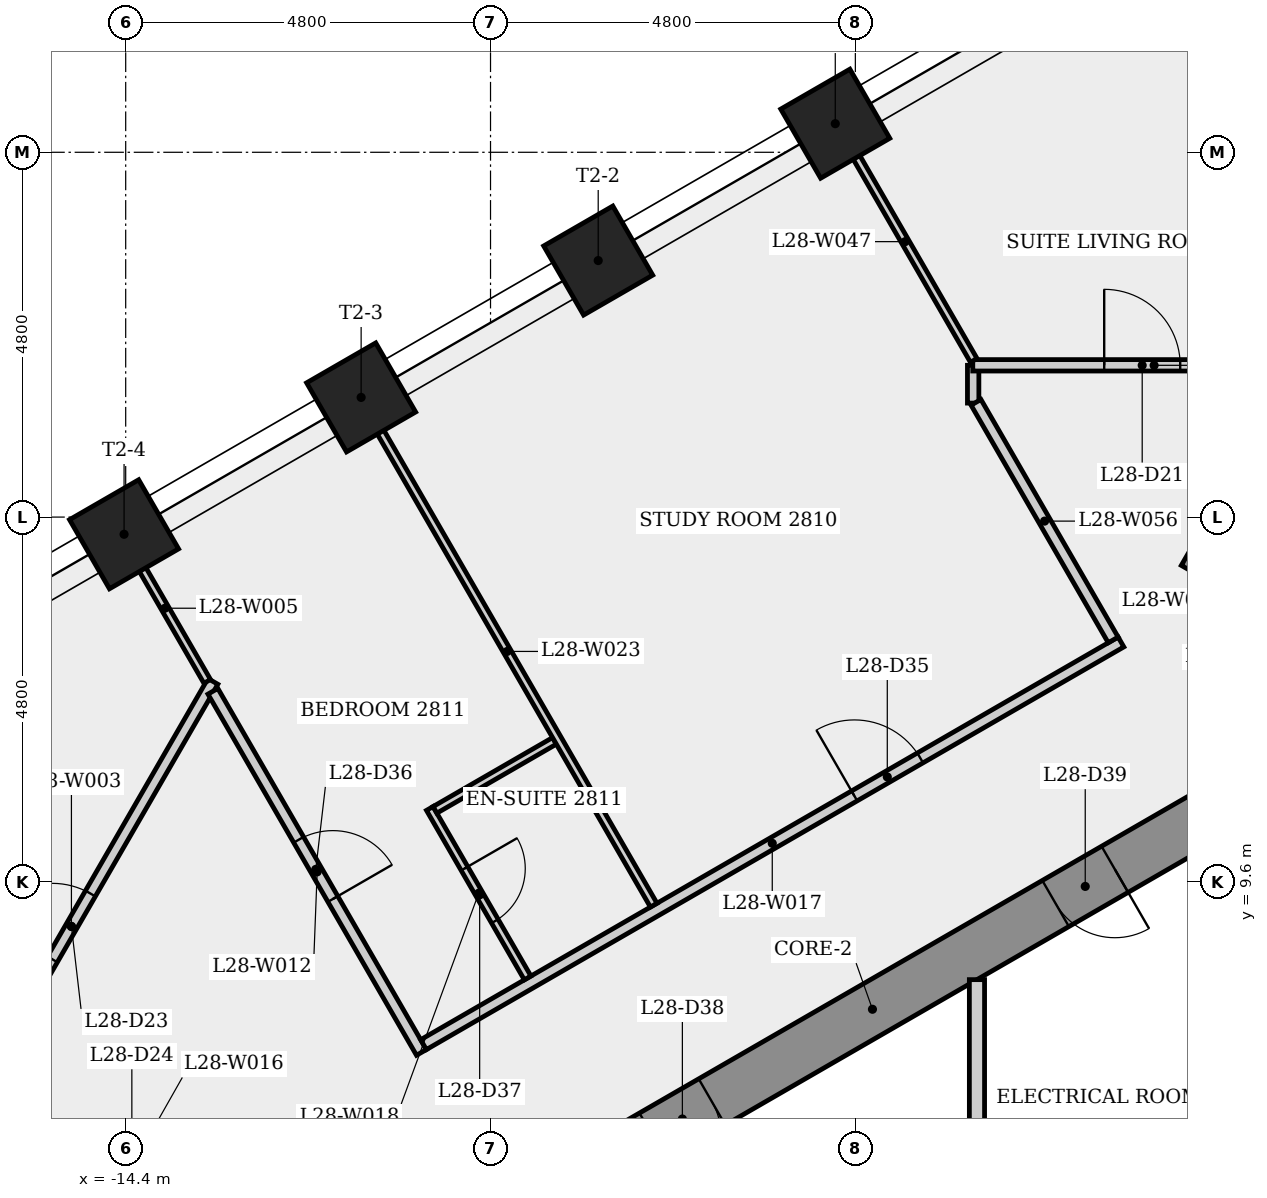
"""IFC4 building model, lengths in metres.
Left out: names, types, materials, properties, quantities, classifications, styles, units other than length and angle.
Written with IfcOpenShell. Run it as: python <this file> out.ifc"""

import sys

from ifc_helpers import new_model, si_unit, direction, frame, frame_2d, origin, origin_2d, place, context, subcontext, project, spatial, rectangle, extrude, element, fill, save


model = new_model("IFC4")
c1 = context("Model", 3, precision=1e-05, world=origin(), true_north=direction((0.0, 1.0)))
c2 = subcontext(c1, "Body", "Model", "MODEL_VIEW")
j1 = project(units=[si_unit("LENGTHUNIT", "METRE"), si_unit("PLANEANGLEUNIT", "RADIAN")], contexts=[c1])
p1 = place(None, origin())
s1 = spatial("IfcSite", under=j1, at=p1, CompositionType="ELEMENT")
p2 = place(p1, origin())
s2 = spatial("IfcBuilding", under=s1, at=p2, CompositionType="ELEMENT")
p3 = place(p2, frame((0.0, 0.0, 106.9)))
s3 = spatial("IfcBuildingStorey", under=s2, at=p3, CompositionType="ELEMENT", Elevation=106.9)
p4 = place(p3, frame((0.175, 10.667, 0.0), z_axis=(0.0, 0.0, 1.0), x_axis=(-0.866023993627, -0.500002442456, 0.0)))
e1 = element("IfcWall", 1, at=p4, inside=s3, PredefinedType="SHEAR", context=c2, shape_type="SweptSolid", body=[
    extrude(rectangle(XDim=10.97, YDim=0.7, at=frame_2d((5.485, 0.0))), origin(), (0.0, 0.0, 1.0), 3.4),
])
p5 = place(p4, frame((7.923, 0.0, 0.0)))
e2 = element("IfcOpeningElement", 2, at=p5, cuts=e1, PredefinedType="OPENING", context=c2, shape_type="SweptSolid", body=[
    extrude(rectangle(XDim=0.9, YDim=2.1, at=frame_2d((0.45, 1.05))), frame((0.0, 0.36, 0.0), z_axis=(0.0, -1.0, 0.0), x_axis=(1.0, 0.0, 0.0)), (0.0, 0.0, 1.0), 0.72),
])
p6 = place(p4, frame((1.802, 0.0, 0.0)))
e3 = element("IfcOpeningElement", 3, at=p6, cuts=e1, PredefinedType="OPENING", context=c2, shape_type="SweptSolid", body=[
    extrude(rectangle(XDim=0.9, YDim=2.1, at=frame_2d((0.45, 1.05))), frame((0.0, 0.36, 0.0), z_axis=(0.0, -1.0, 0.0), x_axis=(1.0, 0.0, 0.0)), (0.0, 0.0, 1.0), 0.72),
])
for number, where, z_axis, x_axis in (
    (4, (-5.064, 19.576, 0.0), (0.0, 0.0, 1.0), (-0.5, 0.866, 0.0)),
    (5, (-8.183, 17.775, 0.0), (0.0, 0.0, 1.0), (-0.5, 0.866, 0.0)),
    (6, (-11.302, 15.975, 0.0), (0.0, 0.0, 1.0), (-0.5, 0.866, 0.0)),
    (7, (-14.421, 14.174, 0.0), (0.0, 0.0, 1.0), (-0.5, 0.866, 0.0)),
):
    element("IfcColumn", number, at=place(p3, frame(where, z_axis=z_axis, x_axis=x_axis)), inside=s3, PredefinedType="COLUMN", context=c2, shape_type="SweptSolid", body=[
        extrude(rectangle(XDim=1.05, YDim=1.05, at=origin_2d()), origin(), (0.0, 0.0, 1.0), 3.4),
    ])
p7 = place(p3, frame((-16.976, 5.79, 0.0), z_axis=(0.0, 0.0, 1.0), x_axis=(0.500025198357, 0.866010855017, 0.0)))
e8 = element("IfcWall", 8, at=p7, inside=s3, PredefinedType="PARTITIONING", context=c2, shape_type="SweptSolid", body=[
    extrude(rectangle(XDim=7.446, YDim=0.15, at=frame_2d((3.723, 0.0))), origin(), (0.0, 0.0, 1.0), 3.05),
])
p8 = place(p7, frame((3.223, 0.0, 0.0)))
e9 = element("IfcOpeningElement", 9, at=p8, cuts=e8, PredefinedType="OPENING", context=c2, shape_type="SweptSolid", body=[
    extrude(rectangle(XDim=1.0, YDim=2.1, at=frame_2d((0.5, 1.05))), frame((0.0, 0.085, 0.0), z_axis=(0.0, -1.0, 0.0), x_axis=(1.0, 0.0, 0.0)), (0.0, 0.0, 1.0), 0.17),
])
p9 = place(p3, frame((-14.439, 14.164, 0.0), z_axis=(0.0, 0.0, 1.0), x_axis=(0.500036104519, -0.866004557827, 0.0)))
e10 = element("IfcWall", 10, at=p9, inside=s3, PredefinedType="PARTITIONING", context=c2, shape_type="SweptSolid", body=[
    extrude(rectangle(XDim=2.223, YDim=0.1, at=frame_2d((1.112, 0.0))), origin(), (0.0, 0.0, 1.0), 3.05),
])
p10 = place(p3, frame((-13.252, 12.108, 0.0), z_axis=(0.0, 0.0, 1.0), x_axis=(0.500015161905, -0.866016649877, 0.0)))
e11 = element("IfcWall", 11, at=p10, inside=s3, PredefinedType="PARTITIONING", context=c2, shape_type="SweptSolid", body=[
    extrude(rectangle(XDim=5.487, YDim=0.15, at=frame_2d((2.744, 0.0))), origin(), (0.0, 0.0, 1.0), 3.05),
])
p11 = place(p10, frame((2.256, 0.0, 0.0)))
e12 = element("IfcOpeningElement", 12, at=p11, cuts=e11, PredefinedType="OPENING", context=c2, shape_type="SweptSolid", body=[
    extrude(rectangle(XDim=0.9, YDim=2.1, at=frame_2d((0.45, 1.05))), frame((0.0, 0.085, 0.0), z_axis=(0.0, -1.0, 0.0), x_axis=(1.0, 0.0, 0.0)), (0.0, 0.0, 1.0), 0.17),
])
p12 = place(p3, frame((-10.481, 7.458, 0.0), z_axis=(0.0, 0.0, 1.0), x_axis=(0.866018292242, 0.500012317351, 0.0)))
e13 = element("IfcWall", 13, at=p12, inside=s3, PredefinedType="PARTITIONING", context=c2, shape_type="SweptSolid", body=[
    extrude(rectangle(XDim=10.596, YDim=0.15, at=frame_2d((5.298, 0.0))), origin(), (0.0, 0.0, 1.0), 3.05),
])
p13 = place(p12, frame((6.546, 0.0, 0.0)))
e14 = element("IfcOpeningElement", 14, at=p13, cuts=e13, PredefinedType="OPENING", context=c2, shape_type="SweptSolid", body=[
    extrude(rectangle(XDim=1.0, YDim=2.1, at=frame_2d((0.5, 1.05))), frame((0.0, 0.085, 0.0), z_axis=(0.0, -1.0, 0.0), x_axis=(1.0, 0.0, 0.0)), (0.0, 0.0, 1.0), 0.17),
])
p14 = place(p3, frame((-10.399, 10.566, 0.0), z_axis=(0.0, 0.0, 1.0), x_axis=(0.499963209246, -0.866046643894, 0.0)))
e15 = element("IfcWall", 15, at=p14, inside=s3, PredefinedType="PARTITIONING", context=c2, shape_type="SweptSolid", body=[
    extrude(rectangle(XDim=2.575, YDim=0.1, at=frame_2d((1.288, 0.0))), origin(), (0.0, 0.0, 1.0), 3.05),
])
p15 = place(p14, frame((0.913, 0.0, 0.0)))
e16 = element("IfcOpeningElement", 16, at=p15, cuts=e15, PredefinedType="OPENING", context=c2, shape_type="SweptSolid", body=[
    extrude(rectangle(XDim=0.8, YDim=2.1, at=frame_2d((0.4, 1.05))), frame((0.0, 0.06, 0.0), z_axis=(0.0, -1.0, 0.0), x_axis=(1.0, 0.0, 0.0)), (0.0, 0.0, 1.0), 0.12),
])
p16 = place(p3, frame((-8.759, 11.455, 0.0), z_axis=(0.0, 0.0, 1.0), x_axis=(-0.865999684151, -0.500044545065, 0.0)))
e17 = element("IfcWall", 17, at=p16, inside=s3, PredefinedType="PARTITIONING", context=c2, shape_type="SweptSolid", body=[
    extrude(rectangle(XDim=1.815, YDim=0.1, at=frame_2d((0.908, 0.0))), origin(), (0.0, 0.0, 1.0), 3.05),
])
p17 = place(p3, frame((-11.308, 15.971, 0.0), z_axis=(0.0, 0.0, 1.0), x_axis=(0.500021201058, -0.866013163002, 0.0)))
e18 = element("IfcWall", 18, at=p17, inside=s3, PredefinedType="PARTITIONING", context=c2, shape_type="SweptSolid", body=[
    extrude(rectangle(XDim=7.711, YDim=0.1, at=frame_2d((3.855, 0.0))), origin(), (0.0, 0.0, 1.0), 3.05),
])
p18 = place(p3, frame((-3.25, 15.9, 0.0), z_axis=(0.0, 0.0, 1.0), x_axis=(0.0, 1.0, 0.0)))
e19 = element("IfcWall", 19, at=p18, inside=s3, PredefinedType="PARTITIONING", context=c2, shape_type="SweptSolid", body=[
    extrude(rectangle(XDim=0.497, YDim=0.15, at=frame_2d((0.249, 0.0))), origin(), (0.0, 0.0, 1.0), 3.05),
])
p19 = place(p3, frame((-3.255, 16.397, 0.0), z_axis=(0.0, 0.0, 1.0), x_axis=(1.0, 0.0, 0.0)))
e20 = element("IfcWall", 20, at=p19, inside=s3, PredefinedType="PARTITIONING", context=c2, shape_type="SweptSolid", body=[
    extrude(rectangle(XDim=4.772, YDim=0.15, at=frame_2d((2.386, 0.0))), origin(), (0.0, 0.0, 1.0), 3.05),
])
p20 = place(p19, frame((1.729, 0.0, 0.0)))
e21 = element("IfcOpeningElement", 21, at=p20, cuts=e20, PredefinedType="OPENING", context=c2, shape_type="SweptSolid", body=[
    extrude(rectangle(XDim=1.0, YDim=2.1, at=frame_2d((0.5, 1.05))), frame((0.0, 0.085, 0.0), z_axis=(0.0, -1.0, 0.0), x_axis=(1.0, 0.0, 0.0)), (0.0, 0.0, 1.0), 0.17),
])
p21 = place(p3, frame((-3.242, 16.462, 0.0), z_axis=(0.0, 0.0, 1.0), x_axis=(-0.500003616288, 0.866023315909, 0.0)))
e22 = element("IfcWall", 22, at=p21, inside=s3, PredefinedType="PARTITIONING", context=c2, shape_type="SweptSolid", body=[
    extrude(rectangle(XDim=3.608, YDim=0.1, at=frame_2d((1.804, 0.0))), origin(), (0.0, 0.0, 1.0), 3.05),
])
p22 = place(p3, frame((-3.2, 8.314, 0.0), z_axis=(0.0, 0.0, 1.0), x_axis=(0.0, -1.0, 0.0)))
e23 = element("IfcWall", 23, at=p22, inside=s3, PredefinedType="PARTITIONING", context=c2, shape_type="SweptSolid", body=[
    extrude(rectangle(XDim=3.039, YDim=0.2, at=frame_2d((1.52, 0.0))), origin(), (0.0, 0.0, 1.0), 3.05),
])
p23 = place(p3, frame((-1.408, 12.784, 0.0), z_axis=(0.0, 0.0, 1.0), x_axis=(-0.499950785441, 0.866053815959, 0.0)))
e24 = element("IfcWall", 24, at=p23, inside=s3, PredefinedType="PARTITIONING", context=c2, shape_type="SweptSolid", body=[
    extrude(rectangle(XDim=3.61, YDim=0.15, at=frame_2d((1.805, 0.0))), origin(), (0.0, 0.0, 1.0), 3.05),
])
p24 = place(p3, frame((-0.403, 13.702, 0.0), z_axis=(0.0, 0.0, 1.0), x_axis=(0.499976111731, 0.866039195244, 0.0)))
e25 = element("IfcWall", 25, at=p24, inside=s3, PredefinedType="SHEAR", context=c2, shape_type="SweptSolid", body=[
    extrude(rectangle(XDim=2.861, YDim=0.25, at=frame_2d((1.43, 0.0))), origin(), (0.0, 0.0, 1.0), 3.05),
])
p25 = place(p20, origin())
e26 = element("IfcDoor", 26, at=p25, inside=s3, OperationType="SINGLE_SWING_LEFT", PredefinedType="DOOR", context=c2, shape_type="SweptSolid", body=[
    extrude(rectangle(XDim=1.0, YDim=2.1, at=frame_2d((0.5, 1.05))), frame((0.0, 0.025, 0.0), z_axis=(0.0, -1.0, 0.0), x_axis=(1.0, 0.0, 0.0)), (0.0, 0.0, 1.0), 0.05),
])
fill(e21, e26)
p26 = place(p8, origin())
e27 = element("IfcDoor", 27, at=p26, inside=s3, OperationType="SINGLE_SWING_LEFT", PredefinedType="DOOR", context=c2, shape_type="SweptSolid", body=[
    extrude(rectangle(XDim=1.0, YDim=2.1, at=frame_2d((0.5, 1.05))), frame((0.0, 0.025, 0.0), z_axis=(0.0, -1.0, 0.0), x_axis=(1.0, 0.0, 0.0)), (0.0, 0.0, 1.0), 0.05),
])
fill(e9, e27)
p27 = place(p13, origin())
e28 = element("IfcDoor", 28, at=p27, inside=s3, OperationType="SINGLE_SWING_LEFT", PredefinedType="DOOR", context=c2, shape_type="SweptSolid", body=[
    extrude(rectangle(XDim=1.0, YDim=2.1, at=frame_2d((0.5, 1.05))), frame((0.0, 0.025, 0.0), z_axis=(0.0, -1.0, 0.0), x_axis=(1.0, 0.0, 0.0)), (0.0, 0.0, 1.0), 0.05),
])
fill(e14, e28)
p28 = place(p11, origin())
e29 = element("IfcDoor", 29, at=p28, inside=s3, OperationType="SINGLE_SWING_RIGHT", PredefinedType="DOOR", context=c2, shape_type="SweptSolid", body=[
    extrude(rectangle(XDim=0.9, YDim=2.1, at=frame_2d((0.45, 1.05))), frame((0.0, 0.025, 0.0), z_axis=(0.0, -1.0, 0.0), x_axis=(1.0, 0.0, 0.0)), (0.0, 0.0, 1.0), 0.05),
])
fill(e12, e29)
p29 = place(p15, origin())
e30 = element("IfcDoor", 30, at=p29, inside=s3, OperationType="SINGLE_SWING_LEFT", PredefinedType="DOOR", context=c2, shape_type="SweptSolid", body=[
    extrude(rectangle(XDim=0.8, YDim=2.1, at=frame_2d((0.4, 1.05))), frame((0.0, 0.025, 0.0), z_axis=(0.0, -1.0, 0.0), x_axis=(1.0, 0.0, 0.0)), (0.0, 0.0, 1.0), 0.05),
])
fill(e16, e30)
p30 = place(p5, origin())
e31 = element("IfcDoor", 31, at=p30, inside=s3, OperationType="SINGLE_SWING_RIGHT", PredefinedType="DOOR", context=c2, shape_type="SweptSolid", body=[
    extrude(rectangle(XDim=0.9, YDim=2.1, at=frame_2d((0.45, 1.05))), frame((0.0, 0.025, 0.0), z_axis=(0.0, -1.0, 0.0), x_axis=(1.0, 0.0, 0.0)), (0.0, 0.0, 1.0), 0.05),
])
fill(e2, e31)
p31 = place(p6, origin())
e32 = element("IfcDoor", 32, at=p31, inside=s3, OperationType="SINGLE_SWING_LEFT", PredefinedType="DOOR", context=c2, shape_type="SweptSolid", body=[
    extrude(rectangle(XDim=0.9, YDim=2.1, at=frame_2d((0.45, 1.05))), frame((0.0, 0.025, 0.0), z_axis=(0.0, -1.0, 0.0), x_axis=(1.0, 0.0, 0.0)), (0.0, 0.0, 1.0), 0.05),
])
fill(e3, e32)
save(model, sys.argv[1])
